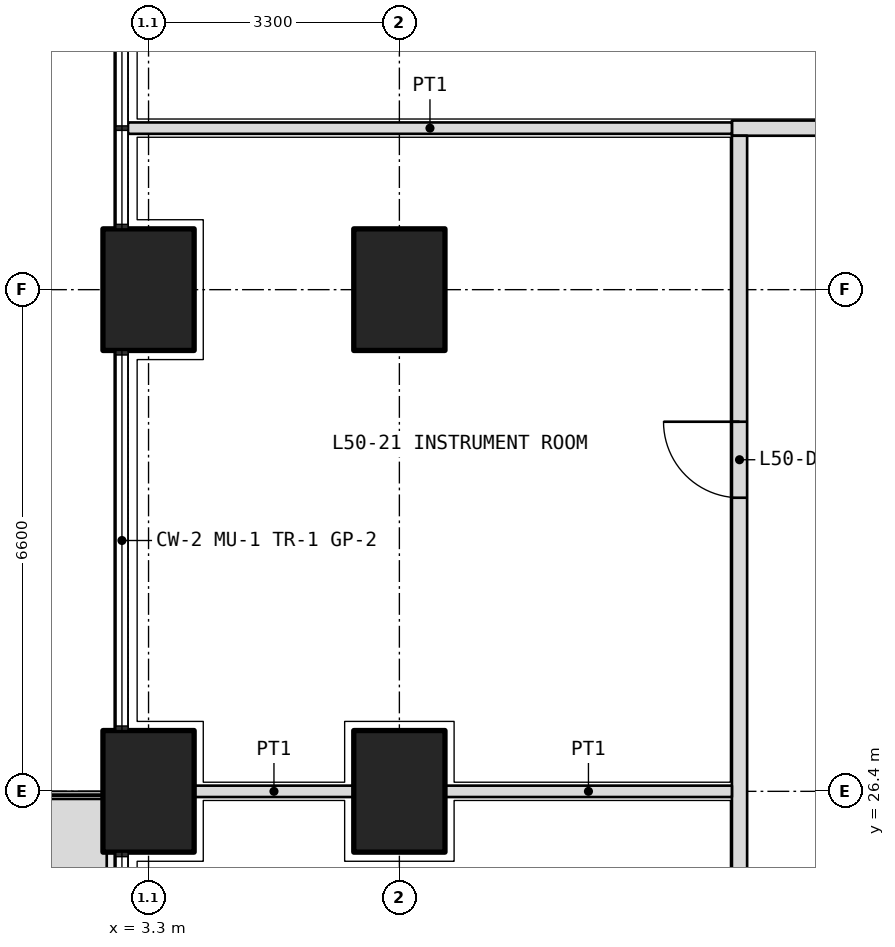
"""IFC4 building model, lengths in metres.
Left out: names, types, materials, properties, quantities, classifications, styles, units other than length and angle.
Written with IfcOpenShell. Run it as: python <this file> out.ifc"""

import sys

from ifc_helpers import new_model, si_unit, direction, frame, frame_2d, origin, origin_2d, place, context, subcontext, project, spatial, polyline, rectangle, outline, extrude, element, fill, save


model = new_model("IFC4")
c1 = context("Model", 3, precision=1e-05, world=origin(), true_north=direction((0.0, 1.0)))
c2 = subcontext(c1, "Body", "Model", "MODEL_VIEW")
j1 = project(units=[si_unit("LENGTHUNIT", "METRE"), si_unit("PLANEANGLEUNIT", "RADIAN")], contexts=[c1])
p1 = place(None, origin())
s1 = spatial("IfcSite", under=j1, at=p1, CompositionType="ELEMENT")
p2 = place(p1, origin())
s2 = spatial("IfcBuilding", under=s1, at=p2, CompositionType="ELEMENT")
p3 = place(p2, frame((0.0, 0.0, 218.7)))
s3 = spatial("IfcBuildingStorey", under=s2, at=p3, CompositionType="ELEMENT", Elevation=218.7)
for number, where, z_axis, x_axis in (
    (1, (3.3, 26.4, 0.0), (0.0, 0.0, 1.0), (0.0, 1.0, 0.0)),
    (2, (3.3, 33.0, 0.0), (0.0, 0.0, 1.0), (0.0, 1.0, 0.0)),
    (3, (6.6, 26.4, 0.0), (0.0, 0.0, 1.0), (0.0, 1.0, 0.0)),
    (4, (6.6, 33.0, 0.0), (0.0, 0.0, 1.0), (0.0, 1.0, 0.0)),
):
    element("IfcColumn", number, at=place(p3, frame(where, z_axis=z_axis, x_axis=x_axis)), inside=s3, PredefinedType="COLUMN", context=c2, shape_type="SweptSolid", body=[
        extrude(rectangle(XDim=1.6, YDim=1.2, at=origin_2d()), origin(), (0.0, 0.0, 1.0), 4.2),
    ])
p4 = place(p3, origin())
e5 = element("IfcWall", 5, at=p4, inside=s3, PredefinedType="USERDEFINED", context=c2, shape_type="SweptSolid", body=[
    extrude(outline(polyline([(1.75, 17.25), (2.75, 17.25), (2.75, 26.3), (1.75, 26.3), (1.75, 17.25)]), holes=[polyline([(1.9, 17.4), (2.6, 17.4), (2.6, 26.15), (1.9, 26.15), (1.9, 17.4)])]), origin(), (0.0, 0.0, 1.0), 1.05),
])
p5 = place(p3, frame((10.975, 35.125, 0.0), z_axis=(0.0, 0.0, 1.0), x_axis=(1.0, 0.0, 0.0)))
e6 = element("IfcWall", 6, at=p5, inside=s3, PredefinedType="PARTITIONING", context=c2, shape_type="SweptSolid", body=[
    extrude(rectangle(XDim=30.85, YDim=0.2, at=frame_2d((15.425, 0.0))), origin(), (0.0, 0.0, 1.0), 2.55),
])
p6 = place(p5, frame((3.863, 0.0, 0.0)))
e7 = element("IfcOpeningElement", 7, at=p6, cuts=e6, PredefinedType="OPENING", context=c2, shape_type="SweptSolid", body=[
    extrude(rectangle(XDim=1.2, YDim=2.1, at=frame_2d((0.6, 1.05))), frame((0.0, 0.11, 0.0), z_axis=(0.0, -1.0, 0.0), x_axis=(1.0, 0.0, 0.0)), (0.0, 0.0, 1.0), 0.22),
])
p7 = place(p5, frame((11.625, 0.0, 0.0)))
e8 = element("IfcOpeningElement", 8, at=p7, cuts=e6, PredefinedType="OPENING", context=c2, shape_type="SweptSolid", body=[
    extrude(rectangle(XDim=1.0, YDim=2.1, at=frame_2d((0.5, 1.05))), frame((0.0, 0.11, 0.0), z_axis=(0.0, -1.0, 0.0), x_axis=(1.0, 0.0, 0.0)), (0.0, 0.0, 1.0), 0.22),
])
p8 = place(p5, frame((18.125, 0.0, 0.0)))
e9 = element("IfcOpeningElement", 9, at=p8, cuts=e6, PredefinedType="OPENING", context=c2, shape_type="SweptSolid", body=[
    extrude(rectangle(XDim=1.2, YDim=2.1, at=frame_2d((0.6, 1.05))), frame((0.0, 0.11, 0.0), z_axis=(0.0, -1.0, 0.0), x_axis=(1.0, 0.0, 0.0)), (0.0, 0.0, 1.0), 0.22),
])
p9 = place(p5, frame((23.625, 0.0, 0.0)))
e10 = element("IfcOpeningElement", 10, at=p9, cuts=e6, PredefinedType="OPENING", context=c2, shape_type="SweptSolid", body=[
    extrude(rectangle(XDim=1.0, YDim=2.1, at=frame_2d((0.5, 1.05))), frame((0.0, 0.11, 0.0), z_axis=(0.0, -1.0, 0.0), x_axis=(1.0, 0.0, 0.0)), (0.0, 0.0, 1.0), 0.22),
])
p10 = place(p5, frame((26.925, 0.0, 0.0)))
e11 = element("IfcOpeningElement", 11, at=p10, cuts=e6, PredefinedType="OPENING", context=c2, shape_type="SweptSolid", body=[
    extrude(rectangle(XDim=1.0, YDim=2.1, at=frame_2d((0.5, 1.05))), frame((0.0, 0.11, 0.0), z_axis=(0.0, -1.0, 0.0), x_axis=(1.0, 0.0, 0.0)), (0.0, 0.0, 1.0), 0.22),
])
p11 = place(p5, frame((29.188, 0.0, 0.0)))
e12 = element("IfcOpeningElement", 12, at=p11, cuts=e6, PredefinedType="OPENING", context=c2, shape_type="SweptSolid", body=[
    extrude(rectangle(XDim=1.0, YDim=2.1, at=frame_2d((0.5, 1.05))), frame((0.0, 0.11, 0.0), z_axis=(0.0, -1.0, 0.0), x_axis=(1.0, 0.0, 0.0)), (0.0, 0.0, 1.0), 0.22),
])
p12 = place(p3, frame((11.075, 11.175, 0.0), z_axis=(0.0, 0.0, 1.0), x_axis=(0.0, 1.0, 0.0)))
e13 = element("IfcWall", 13, at=p12, inside=s3, PredefinedType="PARTITIONING", context=c2, shape_type="SweptSolid", body=[
    extrude(rectangle(XDim=23.85, YDim=0.2, at=frame_2d((11.925, 0.0))), origin(), (0.0, 0.0, 1.0), 2.55),
])
p13 = place(p12, frame((0.462, 0.0, 0.0)))
e14 = element("IfcOpeningElement", 14, at=p13, cuts=e13, PredefinedType="OPENING", context=c2, shape_type="SweptSolid", body=[
    extrude(rectangle(XDim=1.0, YDim=2.1, at=frame_2d((0.5, 1.05))), frame((0.0, 0.11, 0.0), z_axis=(0.0, -1.0, 0.0), x_axis=(1.0, 0.0, 0.0)), (0.0, 0.0, 1.0), 0.22),
])
p14 = place(p12, frame((3.125, 0.0, 0.0)))
e15 = element("IfcOpeningElement", 15, at=p14, cuts=e13, PredefinedType="OPENING", context=c2, shape_type="SweptSolid", body=[
    extrude(rectangle(XDim=1.0, YDim=2.1, at=frame_2d((0.5, 1.05))), frame((0.0, 0.11, 0.0), z_axis=(0.0, -1.0, 0.0), x_axis=(1.0, 0.0, 0.0)), (0.0, 0.0, 1.0), 0.22),
])
p15 = place(p12, frame((6.475, 0.0, 0.0)))
e16 = element("IfcOpeningElement", 16, at=p15, cuts=e13, PredefinedType="OPENING", context=c2, shape_type="SweptSolid", body=[
    extrude(rectangle(XDim=0.9, YDim=2.1, at=frame_2d((0.45, 1.05))), frame((0.0, 0.11, 0.0), z_axis=(0.0, -1.0, 0.0), x_axis=(1.0, 0.0, 0.0)), (0.0, 0.0, 1.0), 0.22),
])
p16 = place(p12, frame((9.675, 0.0, 0.0)))
e17 = element("IfcOpeningElement", 17, at=p16, cuts=e13, PredefinedType="OPENING", context=c2, shape_type="SweptSolid", body=[
    extrude(rectangle(XDim=0.9, YDim=2.1, at=frame_2d((0.45, 1.05))), frame((0.0, 0.11, 0.0), z_axis=(0.0, -1.0, 0.0), x_axis=(1.0, 0.0, 0.0)), (0.0, 0.0, 1.0), 0.22),
])
p17 = place(p12, frame((12.925, 0.0, 0.0)))
e18 = element("IfcOpeningElement", 18, at=p17, cuts=e13, PredefinedType="OPENING", context=c2, shape_type="SweptSolid", body=[
    extrude(rectangle(XDim=1.0, YDim=2.1, at=frame_2d((0.5, 1.05))), frame((0.0, 0.11, 0.0), z_axis=(0.0, -1.0, 0.0), x_axis=(1.0, 0.0, 0.0)), (0.0, 0.0, 1.0), 0.22),
])
p18 = place(p12, frame((19.087, 0.0, 0.0)))
e19 = element("IfcOpeningElement", 19, at=p18, cuts=e13, PredefinedType="OPENING", context=c2, shape_type="SweptSolid", body=[
    extrude(rectangle(XDim=1.0, YDim=2.1, at=frame_2d((0.5, 1.05))), frame((0.0, 0.11, 0.0), z_axis=(0.0, -1.0, 0.0), x_axis=(1.0, 0.0, 0.0)), (0.0, 0.0, 1.0), 0.22),
])
p19 = place(p3, frame((3.03, 35.125, 0.0), z_axis=(0.0, 0.0, 1.0), x_axis=(1.0, 0.0, 0.0)))
e20 = element("IfcWall", 20, at=p19, inside=s3, PredefinedType="PARTITIONING", context=c2, shape_type="SweptSolid", body=[
    extrude(rectangle(XDim=7.945, YDim=0.15, at=frame_2d((3.973, 0.0))), origin(), (0.0, 0.0, 1.0), 3.85),
])
p20 = place(p3, frame((3.9, 26.4, 0.0), z_axis=(0.0, 0.0, 1.0), x_axis=(1.0, 0.0, 0.0)))
e21 = element("IfcWall", 21, at=p20, inside=s3, PredefinedType="PARTITIONING", context=c2, shape_type="SweptSolid", body=[
    extrude(rectangle(XDim=2.1, YDim=0.15, at=frame_2d((1.05, 0.0))), origin(), (0.0, 0.0, 1.0), 2.55),
])
p21 = place(p3, frame((7.2, 26.4, 0.0), z_axis=(0.0, 0.0, 1.0), x_axis=(1.0, 0.0, 0.0)))
e22 = element("IfcWall", 22, at=p21, inside=s3, PredefinedType="PARTITIONING", context=c2, shape_type="SweptSolid", body=[
    extrude(rectangle(XDim=3.775, YDim=0.15, at=frame_2d((1.888, 0.0))), origin(), (0.0, 0.0, 1.0), 2.55),
])
p22 = place(p18, origin())
e23 = element("IfcDoor", 23, at=p22, inside=s3, OperationType="SINGLE_SWING_RIGHT", PredefinedType="DOOR", context=c2, shape_type="SweptSolid", body=[
    extrude(rectangle(XDim=1.0, YDim=2.1, at=frame_2d((0.5, 1.05))), frame((0.0, 0.025, 0.0), z_axis=(0.0, -1.0, 0.0), x_axis=(1.0, 0.0, 0.0)), (0.0, 0.0, 1.0), 0.05),
])
fill(e19, e23)
save(model, sys.argv[1])
